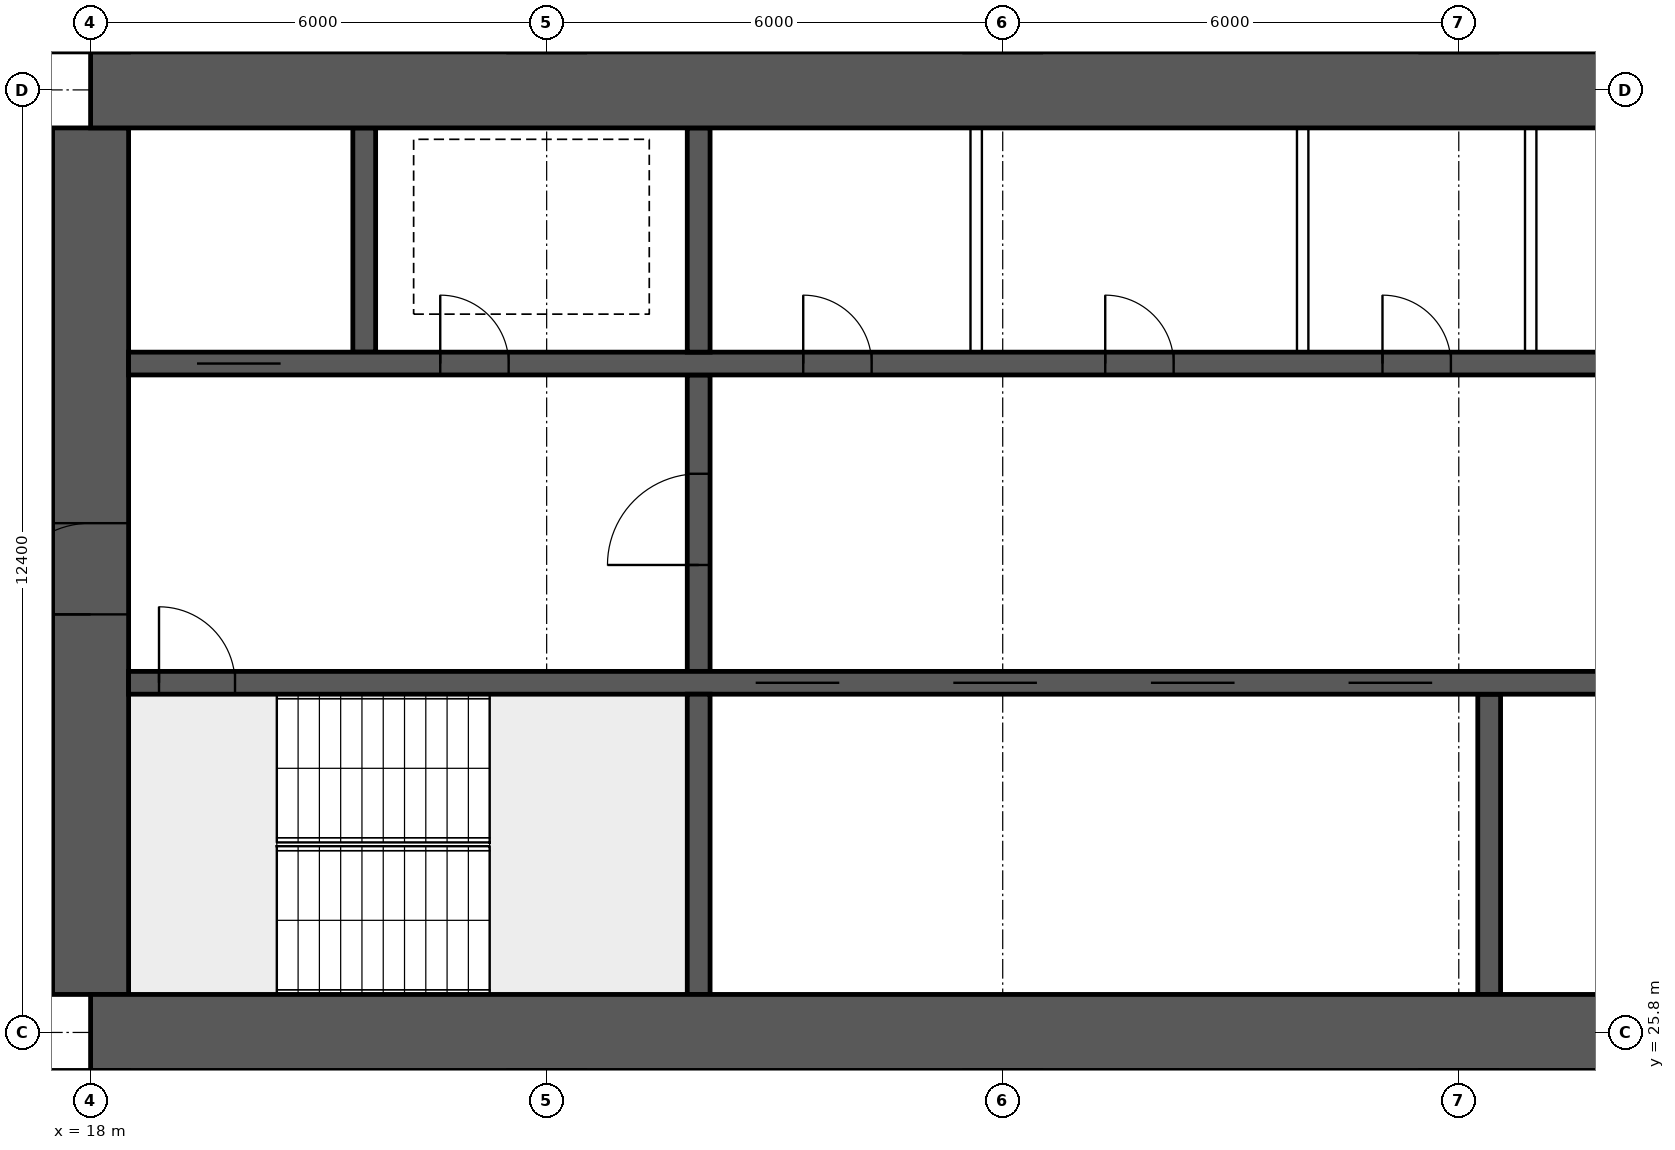
"""IFC4 building model, lengths in metres.
Left out: names, types, materials, properties, quantities, classifications, styles, units other than length and angle.
Written with IfcOpenShell. Run it as: python <this file> out.ifc"""

import sys

from ifc_helpers import new_model, si_unit, direction, frame, frame_2d, origin, place, context, subcontext, project, spatial, rectangle, extrude, element, fill, save


model = new_model("IFC4")
c1 = context("Model", 3, precision=1e-05, world=origin(), true_north=direction((0.0, 1.0)))
c2 = subcontext(c1, "Body", "Model", "MODEL_VIEW")
j1 = project(units=[si_unit("LENGTHUNIT", "METRE"), si_unit("PLANEANGLEUNIT", "RADIAN")], contexts=[c1])
p1 = place(None, origin())
s1 = spatial("IfcSite", under=j1, at=p1, CompositionType="ELEMENT")
p2 = place(p1, origin())
s2 = spatial("IfcBuilding", under=s1, at=p2, CompositionType="ELEMENT")
p3 = place(p2, frame((0.0, 0.0, 57.7)))
s3 = spatial("IfcBuildingStorey", under=s2, at=p3, CompositionType="ELEMENT", Elevation=57.7)
for number, where, z_axis, x_axis in (
    (1, (18.0, 25.8, 0.0), (0.0, 0.0, 1.0), (1.0, 0.0, 0.0)),
    (2, (18.0, 38.2, 0.0), (0.0, 0.0, 1.0), (1.0, 0.0, 0.0)),
):
    element("IfcWall", number, at=place(p3, frame(where, z_axis=z_axis, x_axis=x_axis)), inside=s3, PredefinedType="SHEAR", context=c2, shape_type="SweptSolid", body=[
        extrude(rectangle(XDim=48.0, YDim=1.0, at=frame_2d((24.0, 0.0))), origin(), (0.0, 0.0, 1.0), 3.75),
    ])
p4 = place(p3, frame((18.0, 26.3, 0.0), z_axis=(0.0, 0.0, 1.0), x_axis=(0.0, 1.0, 0.0)))
e3 = element("IfcWall", 3, at=p4, inside=s3, PredefinedType="SHEAR", context=c2, shape_type="SweptSolid", body=[
    extrude(rectangle(XDim=11.4, YDim=1.0, at=frame_2d((5.7, 0.0))), origin(), (0.0, 0.0, 1.0), 3.75),
])
p5 = place(p4, frame((5.0, 0.0, 0.0)))
e4 = element("IfcOpeningElement", 4, at=p5, cuts=e3, PredefinedType="OPENING", context=c2, shape_type="SweptSolid", body=[
    extrude(rectangle(XDim=1.2, YDim=2.1, at=frame_2d((0.6, 1.05))), frame((0.0, 0.51, 0.0), z_axis=(0.0, -1.0, 0.0), x_axis=(1.0, 0.0, 0.0)), (0.0, 0.0, 1.0), 1.02),
])
p6 = place(p3, frame((18.5, 30.4, 0.0), z_axis=(0.0, 0.0, 1.0), x_axis=(1.0, 0.0, 0.0)))
e5 = element("IfcWall", 5, at=p6, inside=s3, PredefinedType="SHEAR", context=c2, shape_type="SweptSolid", body=[
    extrude(rectangle(XDim=47.0, YDim=0.3, at=frame_2d((23.5, 0.0))), origin(), (0.0, 0.0, 1.0), 3.75),
])
p7 = place(p6, frame((0.4, 0.0, 0.0)))
e6 = element("IfcOpeningElement", 6, at=p7, cuts=e5, PredefinedType="OPENING", context=c2, shape_type="SweptSolid", body=[
    extrude(rectangle(XDim=1.0, YDim=2.1, at=frame_2d((0.5, 1.05))), frame((0.0, 0.16, 0.0), z_axis=(0.0, -1.0, 0.0), x_axis=(1.0, 0.0, 0.0)), (0.0, 0.0, 1.0), 0.32),
])
p8 = place(p6, frame((45.6, 0.0, 0.0)))
e7 = element("IfcOpeningElement", 7, at=p8, cuts=e5, PredefinedType="OPENING", context=c2, shape_type="SweptSolid", body=[
    extrude(rectangle(XDim=1.0, YDim=2.1, at=frame_2d((0.5, 1.05))), frame((0.0, 0.16, 0.0), z_axis=(0.0, -1.0, 0.0), x_axis=(1.0, 0.0, 0.0)), (0.0, 0.0, 1.0), 0.32),
])
p9 = place(p6, frame((8.25, 0.0, 0.0)))
e8 = element("IfcOpeningElement", 8, at=p9, cuts=e5, PredefinedType="OPENING", context=c2, shape_type="SweptSolid", body=[
    extrude(rectangle(XDim=1.1, YDim=2.1, at=frame_2d((0.55, 1.05))), frame((0.0, 0.16, 0.0), z_axis=(0.0, -1.0, 0.0), x_axis=(1.0, 0.0, 0.0)), (0.0, 0.0, 1.0), 0.32),
])
p10 = place(p6, frame((10.85, 0.0, 0.0)))
e9 = element("IfcOpeningElement", 9, at=p10, cuts=e5, PredefinedType="OPENING", context=c2, shape_type="SweptSolid", body=[
    extrude(rectangle(XDim=1.1, YDim=2.1, at=frame_2d((0.55, 1.05))), frame((0.0, 0.16, 0.0), z_axis=(0.0, -1.0, 0.0), x_axis=(1.0, 0.0, 0.0)), (0.0, 0.0, 1.0), 0.32),
])
p11 = place(p6, frame((13.45, 0.0, 0.0)))
e10 = element("IfcOpeningElement", 10, at=p11, cuts=e5, PredefinedType="OPENING", context=c2, shape_type="SweptSolid", body=[
    extrude(rectangle(XDim=1.1, YDim=2.1, at=frame_2d((0.55, 1.05))), frame((0.0, 0.16, 0.0), z_axis=(0.0, -1.0, 0.0), x_axis=(1.0, 0.0, 0.0)), (0.0, 0.0, 1.0), 0.32),
])
p12 = place(p6, frame((16.05, 0.0, 0.0)))
e11 = element("IfcOpeningElement", 11, at=p12, cuts=e5, PredefinedType="OPENING", context=c2, shape_type="SweptSolid", body=[
    extrude(rectangle(XDim=1.1, YDim=2.1, at=frame_2d((0.55, 1.05))), frame((0.0, 0.16, 0.0), z_axis=(0.0, -1.0, 0.0), x_axis=(1.0, 0.0, 0.0)), (0.0, 0.0, 1.0), 0.32),
])
p13 = place(p6, frame((30.117, 0.0, 0.0)))
e12 = element("IfcOpeningElement", 12, at=p13, cuts=e5, PredefinedType="OPENING", context=c2, shape_type="SweptSolid", body=[
    extrude(rectangle(XDim=1.1, YDim=2.1, at=frame_2d((0.55, 1.05))), frame((0.0, 0.16, 0.0), z_axis=(0.0, -1.0, 0.0), x_axis=(1.0, 0.0, 0.0)), (0.0, 0.0, 1.0), 0.32),
])
p14 = place(p6, frame((33.65, 0.0, 0.0)))
e13 = element("IfcOpeningElement", 13, at=p14, cuts=e5, PredefinedType="OPENING", context=c2, shape_type="SweptSolid", body=[
    extrude(rectangle(XDim=1.1, YDim=2.1, at=frame_2d((0.55, 1.05))), frame((0.0, 0.16, 0.0), z_axis=(0.0, -1.0, 0.0), x_axis=(1.0, 0.0, 0.0)), (0.0, 0.0, 1.0), 0.32),
])
p15 = place(p6, frame((37.183, 0.0, 0.0)))
e14 = element("IfcOpeningElement", 14, at=p15, cuts=e5, PredefinedType="OPENING", context=c2, shape_type="SweptSolid", body=[
    extrude(rectangle(XDim=1.1, YDim=2.1, at=frame_2d((0.55, 1.05))), frame((0.0, 0.16, 0.0), z_axis=(0.0, -1.0, 0.0), x_axis=(1.0, 0.0, 0.0)), (0.0, 0.0, 1.0), 0.32),
])
p16 = place(p3, frame((18.5, 34.6, 0.0), z_axis=(0.0, 0.0, 1.0), x_axis=(1.0, 0.0, 0.0)))
e15 = element("IfcWall", 15, at=p16, inside=s3, PredefinedType="SHEAR", context=c2, shape_type="SweptSolid", body=[
    extrude(rectangle(XDim=47.0, YDim=0.3, at=frame_2d((23.5, 0.0))), origin(), (0.0, 0.0, 1.0), 3.75),
])
p17 = place(p16, frame((0.9, 0.0, 0.0)))
e16 = element("IfcOpeningElement", 16, at=p17, cuts=e15, PredefinedType="OPENING", context=c2, shape_type="SweptSolid", body=[
    extrude(rectangle(XDim=1.1, YDim=2.1, at=frame_2d((0.55, 1.05))), frame((0.0, 0.16, 0.0), z_axis=(0.0, -1.0, 0.0), x_axis=(1.0, 0.0, 0.0)), (0.0, 0.0, 1.0), 0.32),
])
p18 = place(p16, frame((45.0, 0.0, 0.0)))
e17 = element("IfcOpeningElement", 17, at=p18, cuts=e15, PredefinedType="OPENING", context=c2, shape_type="SweptSolid", body=[
    extrude(rectangle(XDim=1.1, YDim=2.1, at=frame_2d((0.55, 1.05))), frame((0.0, 0.16, 0.0), z_axis=(0.0, -1.0, 0.0), x_axis=(1.0, 0.0, 0.0)), (0.0, 0.0, 1.0), 0.32),
])
p19 = place(p16, frame((4.1, 0.0, 0.0)))
e18 = element("IfcOpeningElement", 18, at=p19, cuts=e15, PredefinedType="OPENING", context=c2, shape_type="SweptSolid", body=[
    extrude(rectangle(XDim=0.9, YDim=2.1, at=frame_2d((0.45, 1.05))), frame((0.0, 0.16, 0.0), z_axis=(0.0, -1.0, 0.0), x_axis=(1.0, 0.0, 0.0)), (0.0, 0.0, 1.0), 0.32),
])
p20 = place(p16, frame((42.0, 0.0, 0.0)))
e19 = element("IfcOpeningElement", 19, at=p20, cuts=e15, PredefinedType="OPENING", context=c2, shape_type="SweptSolid", body=[
    extrude(rectangle(XDim=0.9, YDim=2.1, at=frame_2d((0.45, 1.05))), frame((0.0, 0.16, 0.0), z_axis=(0.0, -1.0, 0.0), x_axis=(1.0, 0.0, 0.0)), (0.0, 0.0, 1.0), 0.32),
])
p21 = place(p16, frame((8.875, 0.0, 0.0)))
e20 = element("IfcOpeningElement", 20, at=p21, cuts=e15, PredefinedType="OPENING", context=c2, shape_type="SweptSolid", body=[
    extrude(rectangle(XDim=0.9, YDim=2.1, at=frame_2d((0.45, 1.05))), frame((0.0, 0.16, 0.0), z_axis=(0.0, -1.0, 0.0), x_axis=(1.0, 0.0, 0.0)), (0.0, 0.0, 1.0), 0.32),
])
p22 = place(p16, frame((12.849, 0.0, 0.0)))
e21 = element("IfcOpeningElement", 21, at=p22, cuts=e15, PredefinedType="OPENING", context=c2, shape_type="SweptSolid", body=[
    extrude(rectangle(XDim=0.9, YDim=2.1, at=frame_2d((0.45, 1.05))), frame((0.0, 0.16, 0.0), z_axis=(0.0, -1.0, 0.0), x_axis=(1.0, 0.0, 0.0)), (0.0, 0.0, 1.0), 0.32),
])
p23 = place(p16, frame((16.496, 0.0, 0.0)))
e22 = element("IfcOpeningElement", 22, at=p23, cuts=e15, PredefinedType="OPENING", context=c2, shape_type="SweptSolid", body=[
    extrude(rectangle(XDim=0.9, YDim=2.1, at=frame_2d((0.45, 1.05))), frame((0.0, 0.16, 0.0), z_axis=(0.0, -1.0, 0.0), x_axis=(1.0, 0.0, 0.0)), (0.0, 0.0, 1.0), 0.32),
])
p24 = place(p16, frame((20.255, 0.0, 0.0)))
e23 = element("IfcOpeningElement", 23, at=p24, cuts=e15, PredefinedType="OPENING", context=c2, shape_type="SweptSolid", body=[
    extrude(rectangle(XDim=0.9, YDim=2.1, at=frame_2d((0.45, 1.05))), frame((0.0, 0.16, 0.0), z_axis=(0.0, -1.0, 0.0), x_axis=(1.0, 0.0, 0.0)), (0.0, 0.0, 1.0), 0.32),
])
p25 = place(p16, frame((24.661, 0.0, 0.0)))
e24 = element("IfcOpeningElement", 24, at=p25, cuts=e15, PredefinedType="OPENING", context=c2, shape_type="SweptSolid", body=[
    extrude(rectangle(XDim=0.9, YDim=2.1, at=frame_2d((0.45, 1.05))), frame((0.0, 0.16, 0.0), z_axis=(0.0, -1.0, 0.0), x_axis=(1.0, 0.0, 0.0)), (0.0, 0.0, 1.0), 0.32),
])
p26 = place(p16, frame((27.458, 0.0, 0.0)))
e25 = element("IfcOpeningElement", 25, at=p26, cuts=e15, PredefinedType="OPENING", context=c2, shape_type="SweptSolid", body=[
    extrude(rectangle(XDim=0.9, YDim=2.1, at=frame_2d((0.45, 1.05))), frame((0.0, 0.16, 0.0), z_axis=(0.0, -1.0, 0.0), x_axis=(1.0, 0.0, 0.0)), (0.0, 0.0, 1.0), 0.32),
])
p27 = place(p16, frame((29.831, 0.0, 0.0)))
e26 = element("IfcOpeningElement", 26, at=p27, cuts=e15, PredefinedType="OPENING", context=c2, shape_type="SweptSolid", body=[
    extrude(rectangle(XDim=0.9, YDim=2.1, at=frame_2d((0.45, 1.05))), frame((0.0, 0.16, 0.0), z_axis=(0.0, -1.0, 0.0), x_axis=(1.0, 0.0, 0.0)), (0.0, 0.0, 1.0), 0.32),
])
p28 = place(p16, frame((35.302, 0.0, 0.0)))
e27 = element("IfcOpeningElement", 27, at=p28, cuts=e15, PredefinedType="OPENING", context=c2, shape_type="SweptSolid", body=[
    extrude(rectangle(XDim=0.9, YDim=2.1, at=frame_2d((0.45, 1.05))), frame((0.0, 0.16, 0.0), z_axis=(0.0, -1.0, 0.0), x_axis=(1.0, 0.0, 0.0)), (0.0, 0.0, 1.0), 0.32),
])
p29 = place(p3, frame((26.0, 26.3, 0.0), z_axis=(0.0, 0.0, 1.0), x_axis=(0.0, 1.0, 0.0)))
e28 = element("IfcWall", 28, at=p29, inside=s3, PredefinedType="SHEAR", context=c2, shape_type="SweptSolid", body=[
    extrude(rectangle(XDim=3.95, YDim=0.3, at=frame_2d((1.975, 0.0))), origin(), (0.0, 0.0, 1.0), 3.75),
])
p30 = place(p3, frame((26.0, 30.55, 0.0), z_axis=(0.0, 0.0, 1.0), x_axis=(0.0, 1.0, 0.0)))
e29 = element("IfcWall", 29, at=p30, inside=s3, PredefinedType="SHEAR", context=c2, shape_type="SweptSolid", body=[
    extrude(rectangle(XDim=3.9, YDim=0.3, at=frame_2d((1.95, 0.0))), origin(), (0.0, 0.0, 1.0), 3.75),
])
p31 = place(p30, frame((1.4, 0.0, 0.0)))
e30 = element("IfcOpeningElement", 30, at=p31, cuts=e29, PredefinedType="OPENING", context=c2, shape_type="SweptSolid", body=[
    extrude(rectangle(XDim=1.2, YDim=2.1, at=frame_2d((0.6, 1.05))), frame((0.0, 0.16, 0.0), z_axis=(0.0, -1.0, 0.0), x_axis=(1.0, 0.0, 0.0)), (0.0, 0.0, 1.0), 0.32),
])
for number, where, z_axis, x_axis in (
    (31, (21.6, 34.75, 0.0), (0.0, 0.0, 1.0), (0.0, 1.0, 0.0)),
    (32, (26.0, 34.75, 0.0), (0.0, 0.0, 1.0), (0.0, 1.0, 0.0)),
):
    element("IfcWall", number, at=place(p3, frame(where, z_axis=z_axis, x_axis=x_axis)), inside=s3, PredefinedType="SHEAR", context=c2, shape_type="SweptSolid", body=[
        extrude(rectangle(XDim=2.95, YDim=0.3, at=frame_2d((1.475, 0.0))), origin(), (0.0, 0.0, 1.0), 3.75),
    ])
p32 = place(p3, frame((36.4, 26.3, 0.0), z_axis=(0.0, 0.0, 1.0), x_axis=(0.0, 1.0, 0.0)))
e33 = element("IfcWall", 33, at=p32, inside=s3, PredefinedType="SHEAR", context=c2, shape_type="SweptSolid", body=[
    extrude(rectangle(XDim=3.95, YDim=0.3, at=frame_2d((1.975, 0.0))), origin(), (0.0, 0.0, 1.0), 3.75),
])
for number, where, z_axis, x_axis in (
    (34, (29.651, 34.75, 0.0), (0.0, 0.0, 1.0), (0.0, 1.0, 0.0)),
    (35, (33.946, 34.75, 0.0), (0.0, 0.0, 1.0), (0.0, 1.0, 0.0)),
    (36, (36.946, 34.75, 0.0), (0.0, 0.0, 1.0), (0.0, 1.0, 0.0)),
):
    element("IfcWall", number, at=place(p3, frame(where, z_axis=z_axis, x_axis=x_axis)), inside=s3, PredefinedType="SOLIDWALL", context=c2, shape_type="SweptSolid", body=[
        extrude(rectangle(XDim=2.95, YDim=0.15, at=frame_2d((1.475, 0.0))), origin(), (0.0, 0.0, 1.0), 3.5),
    ])
p33 = place(p5, origin())
e37 = element("IfcDoor", 37, at=p33, inside=s3, OperationType="SINGLE_SWING_LEFT", PredefinedType="DOOR", context=c2, shape_type="SweptSolid", body=[
    extrude(rectangle(XDim=1.2, YDim=2.1, at=frame_2d((0.6, 1.05))), frame((0.0, 0.025, 0.0), z_axis=(0.0, -1.0, 0.0), x_axis=(1.0, 0.0, 0.0)), (0.0, 0.0, 1.0), 0.05),
])
fill(e4, e37)
p34 = place(p7, origin())
e38 = element("IfcDoor", 38, at=p34, inside=s3, OperationType="SINGLE_SWING_LEFT", PredefinedType="DOOR", context=c2, shape_type="SweptSolid", body=[
    extrude(rectangle(XDim=1.0, YDim=2.1, at=frame_2d((0.5, 1.05))), frame((0.0, 0.025, 0.0), z_axis=(0.0, -1.0, 0.0), x_axis=(1.0, 0.0, 0.0)), (0.0, 0.0, 1.0), 0.05),
])
fill(e6, e38)
p35 = place(p17, origin())
e39 = element("IfcDoor", 39, at=p35, inside=s3, OperationType="DOUBLE_DOOR_SLIDING", PredefinedType="DOOR", context=c2, shape_type="SweptSolid", body=[
    extrude(rectangle(XDim=1.1, YDim=2.1, at=frame_2d((0.55, 1.05))), frame((0.0, 0.025, 0.0), z_axis=(0.0, -1.0, 0.0), x_axis=(1.0, 0.0, 0.0)), (0.0, 0.0, 1.0), 0.05),
])
fill(e16, e39)
p36 = place(p19, origin())
e40 = element("IfcDoor", 40, at=p36, inside=s3, OperationType="SINGLE_SWING_LEFT", PredefinedType="DOOR", context=c2, shape_type="SweptSolid", body=[
    extrude(rectangle(XDim=0.9, YDim=2.1, at=frame_2d((0.45, 1.05))), frame((0.0, 0.025, 0.0), z_axis=(0.0, -1.0, 0.0), x_axis=(1.0, 0.0, 0.0)), (0.0, 0.0, 1.0), 0.05),
])
fill(e18, e40)
p37 = place(p31, origin())
e41 = element("IfcDoor", 41, at=p37, inside=s3, OperationType="SINGLE_SWING_LEFT", PredefinedType="DOOR", context=c2, shape_type="SweptSolid", body=[
    extrude(rectangle(XDim=1.2, YDim=2.1, at=frame_2d((0.6, 1.05))), frame((0.0, 0.025, 0.0), z_axis=(0.0, -1.0, 0.0), x_axis=(1.0, 0.0, 0.0)), (0.0, 0.0, 1.0), 0.05),
])
fill(e30, e41)
p38 = place(p21, origin())
e42 = element("IfcDoor", 42, at=p38, inside=s3, OperationType="SINGLE_SWING_LEFT", PredefinedType="DOOR", context=c2, shape_type="SweptSolid", body=[
    extrude(rectangle(XDim=0.9, YDim=2.1, at=frame_2d((0.45, 1.05))), frame((0.0, 0.025, 0.0), z_axis=(0.0, -1.0, 0.0), x_axis=(1.0, 0.0, 0.0)), (0.0, 0.0, 1.0), 0.05),
])
fill(e20, e42)
p39 = place(p22, origin())
e43 = element("IfcDoor", 43, at=p39, inside=s3, OperationType="SINGLE_SWING_LEFT", PredefinedType="DOOR", context=c2, shape_type="SweptSolid", body=[
    extrude(rectangle(XDim=0.9, YDim=2.1, at=frame_2d((0.45, 1.05))), frame((0.0, 0.025, 0.0), z_axis=(0.0, -1.0, 0.0), x_axis=(1.0, 0.0, 0.0)), (0.0, 0.0, 1.0), 0.05),
])
fill(e21, e43)
p40 = place(p23, origin())
e44 = element("IfcDoor", 44, at=p40, inside=s3, OperationType="SINGLE_SWING_LEFT", PredefinedType="DOOR", context=c2, shape_type="SweptSolid", body=[
    extrude(rectangle(XDim=0.9, YDim=2.1, at=frame_2d((0.45, 1.05))), frame((0.0, 0.025, 0.0), z_axis=(0.0, -1.0, 0.0), x_axis=(1.0, 0.0, 0.0)), (0.0, 0.0, 1.0), 0.05),
])
fill(e22, e44)
p41 = place(p9, origin())
e45 = element("IfcDoor", 45, at=p41, inside=s3, OperationType="DOUBLE_DOOR_SLIDING", PredefinedType="DOOR", context=c2, shape_type="SweptSolid", body=[
    extrude(rectangle(XDim=1.1, YDim=2.1, at=frame_2d((0.55, 1.05))), frame((0.0, 0.025, 0.0), z_axis=(0.0, -1.0, 0.0), x_axis=(1.0, 0.0, 0.0)), (0.0, 0.0, 1.0), 0.05),
])
fill(e8, e45)
p42 = place(p10, origin())
e46 = element("IfcDoor", 46, at=p42, inside=s3, OperationType="DOUBLE_DOOR_SLIDING", PredefinedType="DOOR", context=c2, shape_type="SweptSolid", body=[
    extrude(rectangle(XDim=1.1, YDim=2.1, at=frame_2d((0.55, 1.05))), frame((0.0, 0.025, 0.0), z_axis=(0.0, -1.0, 0.0), x_axis=(1.0, 0.0, 0.0)), (0.0, 0.0, 1.0), 0.05),
])
fill(e9, e46)
p43 = place(p11, origin())
e47 = element("IfcDoor", 47, at=p43, inside=s3, OperationType="DOUBLE_DOOR_SLIDING", PredefinedType="DOOR", context=c2, shape_type="SweptSolid", body=[
    extrude(rectangle(XDim=1.1, YDim=2.1, at=frame_2d((0.55, 1.05))), frame((0.0, 0.025, 0.0), z_axis=(0.0, -1.0, 0.0), x_axis=(1.0, 0.0, 0.0)), (0.0, 0.0, 1.0), 0.05),
])
fill(e10, e47)
p44 = place(p12, origin())
e48 = element("IfcDoor", 48, at=p44, inside=s3, OperationType="DOUBLE_DOOR_SLIDING", PredefinedType="DOOR", context=c2, shape_type="SweptSolid", body=[
    extrude(rectangle(XDim=1.1, YDim=2.1, at=frame_2d((0.55, 1.05))), frame((0.0, 0.025, 0.0), z_axis=(0.0, -1.0, 0.0), x_axis=(1.0, 0.0, 0.0)), (0.0, 0.0, 1.0), 0.05),
])
fill(e11, e48)
save(model, sys.argv[1])
